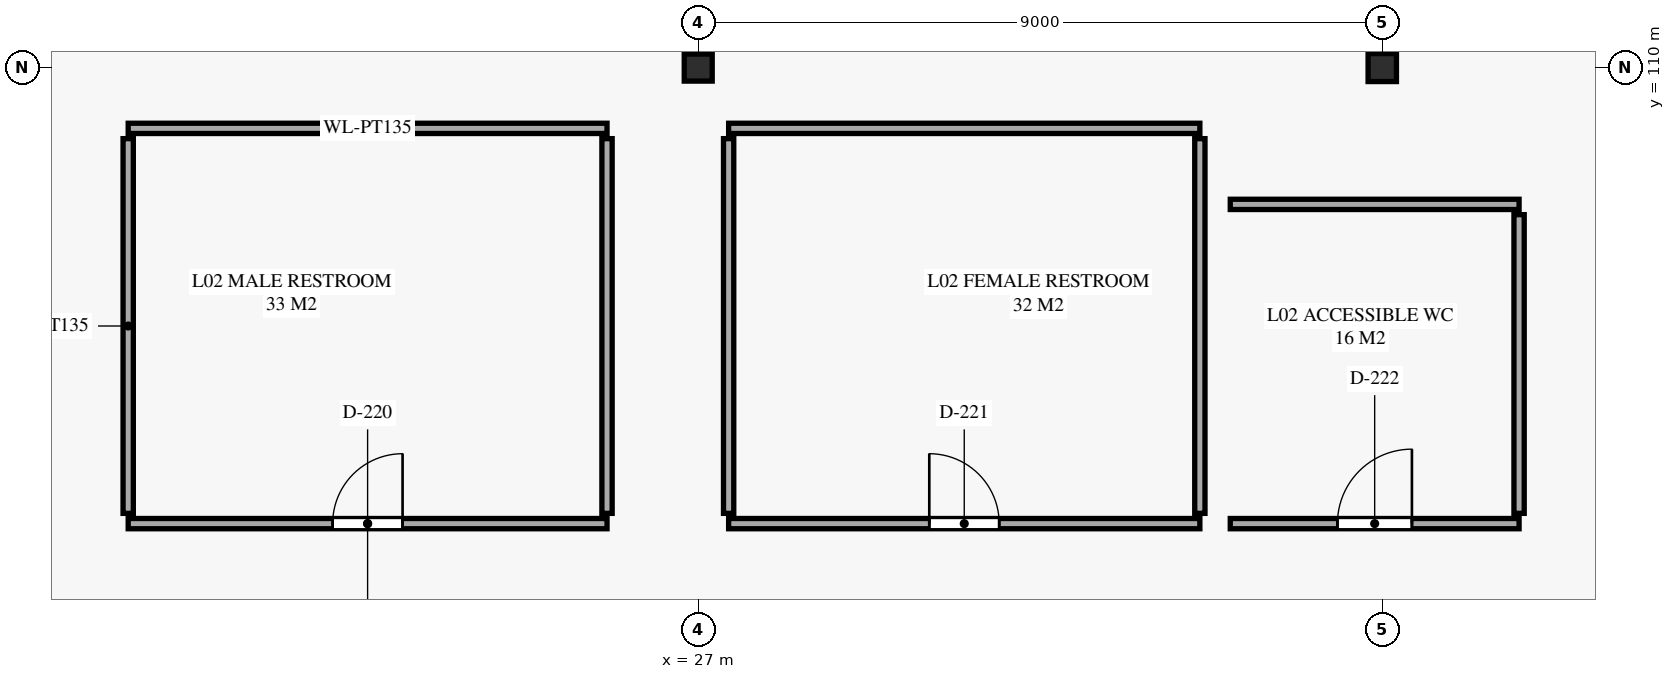
"""IFC4 building model, lengths in metres.
Left out: names, types, materials, properties, quantities, classifications, styles, units other than length and angle.
Written with IfcOpenShell. Run it as: python <this file> out.ifc"""

import sys

from ifc_helpers import new_model, si_unit, direction, frame, frame_2d, origin, origin_2d, place, context, subcontext, project, spatial, rectangle, i_section, extrude, element, fill, save


model = new_model("IFC4")
c1 = context("Model", 3, precision=1e-05, world=origin(), true_north=direction((0.0, 1.0)))
c2 = subcontext(c1, "Body", "Model", "MODEL_VIEW")
j1 = project(units=[si_unit("LENGTHUNIT", "METRE"), si_unit("PLANEANGLEUNIT", "RADIAN")], contexts=[c1])
p1 = place(None, origin())
s1 = spatial("IfcSite", under=j1, at=p1, CompositionType="ELEMENT")
p2 = place(p1, origin())
s2 = spatial("IfcBuilding", under=s1, at=p2, CompositionType="ELEMENT")
p3 = place(p2, frame((0.0, 0.0, 10.0)))
s3 = spatial("IfcBuildingStorey", under=s2, at=p3, CompositionType="ELEMENT", Elevation=10.0)
p4 = place(p3, frame((27.0, 110.0, 0.0), z_axis=(0.0, 0.0, 1.0), x_axis=(1.0, 0.0, 0.0)))
e1 = element("IfcColumn", 1, at=p4, inside=s3, PredefinedType="COLUMN", context=c2, shape_type="SweptSolid", body=[
    extrude(i_section(OverallWidth=0.368, OverallDepth=0.356, WebThickness=0.011, FlangeThickness=0.018, FilletRadius=0.015, at=origin_2d()), origin(), (0.0, 0.0, 1.0), 5.0),
])
p5 = place(p3, frame((36.0, 110.0, 0.0), z_axis=(0.0, 0.0, 1.0), x_axis=(1.0, 0.0, 0.0)))
e2 = element("IfcColumn", 2, at=p5, inside=s3, PredefinedType="COLUMN", context=c2, shape_type="SweptSolid", body=[
    extrude(i_section(OverallWidth=0.373, OverallDepth=0.368, WebThickness=0.015, FlangeThickness=0.024, FilletRadius=0.015, at=origin_2d()), origin(), (0.0, 0.0, 1.0), 5.0),
])
p6 = place(p3, frame((19.5, 104.0, 0.0), z_axis=(0.0, 0.0, 1.0), x_axis=(1.0, 0.0, 0.0)))
e3 = element("IfcWall", 3, at=p6, inside=s3, PredefinedType="PARTITIONING", context=c2, shape_type="SweptSolid", body=[
    extrude(rectangle(XDim=6.3, YDim=0.135, at=frame_2d((3.15, 0.0))), origin(), (0.0, 0.0, 1.0), 4.72),
])
p7 = place(p6, frame((2.69, 0.0, 0.0)))
e4 = element("IfcOpeningElement", 4, at=p7, cuts=e3, PredefinedType="OPENING", context=c2, shape_type="SweptSolid", body=[
    extrude(rectangle(XDim=0.92, YDim=2.1, at=frame_2d((0.46, 1.05))), frame((0.0, 0.078, 0.0), z_axis=(0.0, -1.0, 0.0), x_axis=(1.0, 0.0, 0.0)), (0.0, 0.0, 1.0), 0.155),
])
p8 = place(p3, frame((25.8, 109.2, 0.0), z_axis=(0.0, 0.0, 1.0), x_axis=(-1.0, 0.0, 0.0)))
e5 = element("IfcWall", 5, at=p8, inside=s3, PredefinedType="PARTITIONING", context=c2, shape_type="SweptSolid", body=[
    extrude(rectangle(XDim=6.3, YDim=0.135, at=frame_2d((3.15, 0.0))), origin(), (0.0, 0.0, 1.0), 4.72),
])
for number, where, z_axis, x_axis in (
    (6, (19.5, 109.065, 0.0), (0.0, 0.0, 1.0), (0.0, -1.0, 0.0)),
    (7, (25.8, 104.135, 0.0), (0.0, 0.0, 1.0), (0.0, 1.0, 0.0)),
):
    element("IfcWall", number, at=place(p3, frame(where, z_axis=z_axis, x_axis=x_axis)), inside=s3, PredefinedType="PARTITIONING", context=c2, shape_type="SweptSolid", body=[
        extrude(rectangle(XDim=4.93, YDim=0.135, at=frame_2d((2.465, 0.0))), origin(), (0.0, 0.0, 1.0), 4.72),
    ])
p9 = place(p3, frame((27.4, 104.0, 0.0), z_axis=(0.0, 0.0, 1.0), x_axis=(1.0, 0.0, 0.0)))
e8 = element("IfcWall", 8, at=p9, inside=s3, PredefinedType="PARTITIONING", context=c2, shape_type="SweptSolid", body=[
    extrude(rectangle(XDim=6.2, YDim=0.135, at=frame_2d((3.1, 0.0))), origin(), (0.0, 0.0, 1.0), 4.72),
])
p10 = place(p9, frame((2.64, 0.0, 0.0)))
e9 = element("IfcOpeningElement", 9, at=p10, cuts=e8, PredefinedType="OPENING", context=c2, shape_type="SweptSolid", body=[
    extrude(rectangle(XDim=0.92, YDim=2.1, at=frame_2d((0.46, 1.05))), frame((0.0, 0.078, 0.0), z_axis=(0.0, -1.0, 0.0), x_axis=(1.0, 0.0, 0.0)), (0.0, 0.0, 1.0), 0.155),
])
p11 = place(p3, frame((33.6, 109.2, 0.0), z_axis=(0.0, 0.0, 1.0), x_axis=(-1.0, 0.0, 0.0)))
e10 = element("IfcWall", 10, at=p11, inside=s3, PredefinedType="PARTITIONING", context=c2, shape_type="SweptSolid", body=[
    extrude(rectangle(XDim=6.2, YDim=0.135, at=frame_2d((3.1, 0.0))), origin(), (0.0, 0.0, 1.0), 4.72),
])
p12 = place(p3, frame((27.4, 109.065, 0.0), z_axis=(0.0, 0.0, 1.0), x_axis=(0.0, -1.0, 0.0)))
e11 = element("IfcWall", 11, at=p12, inside=s3, PredefinedType="PARTITIONING", context=c2, shape_type="SweptSolid", body=[
    extrude(rectangle(XDim=4.93, YDim=0.135, at=frame_2d((2.465, 0.0))), origin(), (0.0, 0.0, 1.0), 4.72),
])
p13 = place(p3, frame((33.6, 104.135, 0.0), z_axis=(0.0, 0.0, 1.0), x_axis=(0.0, 1.0, 0.0)))
e12 = element("IfcWall", 12, at=p13, inside=s3, PredefinedType="PARTITIONING", context=c2, shape_type="SweptSolid", body=[
    extrude(rectangle(XDim=4.93, YDim=0.135, at=frame_2d((2.465, 0.0))), origin(), (0.0, 0.0, 1.0), 4.306),
])
p14 = place(p3, frame((34.0, 104.0, 0.0), z_axis=(0.0, 0.0, 1.0), x_axis=(1.0, 0.0, 0.0)))
e13 = element("IfcWall", 13, at=p14, inside=s3, PredefinedType="PARTITIONING", context=c2, shape_type="SweptSolid", body=[
    extrude(rectangle(XDim=3.8, YDim=0.135, at=frame_2d((1.9, 0.0))), origin(), (0.0, 0.0, 1.0), 4.72),
])
p15 = place(p14, frame((1.41, 0.0, 0.0)))
e14 = element("IfcOpeningElement", 14, at=p15, cuts=e13, PredefinedType="OPENING", context=c2, shape_type="SweptSolid", body=[
    extrude(rectangle(XDim=0.98, YDim=2.1, at=frame_2d((0.49, 1.05))), frame((0.0, 0.078, 0.0), z_axis=(0.0, -1.0, 0.0), x_axis=(1.0, 0.0, 0.0)), (0.0, 0.0, 1.0), 0.155),
])
p16 = place(p3, frame((37.8, 108.2, 0.0), z_axis=(0.0, 0.0, 1.0), x_axis=(-1.0, 0.0, 0.0)))
e15 = element("IfcWall", 15, at=p16, inside=s3, PredefinedType="PARTITIONING", context=c2, shape_type="SweptSolid", body=[
    extrude(rectangle(XDim=3.8, YDim=0.135, at=frame_2d((1.9, 0.0))), origin(), (0.0, 0.0, 1.0), 4.72),
])
p17 = place(p3, frame((37.8, 104.135, 0.0), z_axis=(0.0, 0.0, 1.0), x_axis=(0.0, 1.0, 0.0)))
e16 = element("IfcWall", 16, at=p17, inside=s3, PredefinedType="PARTITIONING", context=c2, shape_type="SweptSolid", body=[
    extrude(rectangle(XDim=3.93, YDim=0.135, at=frame_2d((1.965, 0.0))), origin(), (0.0, 0.0, 1.0), 4.72),
])
p18 = place(p7, origin())
e17 = element("IfcDoor", 17, at=p18, inside=s3, OperationType="SINGLE_SWING_RIGHT", PredefinedType="DOOR", context=c2, shape_type="SweptSolid", body=[
    extrude(rectangle(XDim=0.92, YDim=2.1, at=frame_2d((0.46, 1.05))), frame((0.0, 0.025, 0.0), z_axis=(0.0, -1.0, 0.0), x_axis=(1.0, 0.0, 0.0)), (0.0, 0.0, 1.0), 0.05),
])
fill(e4, e17)
p19 = place(p10, origin())
e18 = element("IfcDoor", 18, at=p19, inside=s3, OperationType="SINGLE_SWING_LEFT", PredefinedType="DOOR", context=c2, shape_type="SweptSolid", body=[
    extrude(rectangle(XDim=0.92, YDim=2.1, at=frame_2d((0.46, 1.05))), frame((0.0, 0.025, 0.0), z_axis=(0.0, -1.0, 0.0), x_axis=(1.0, 0.0, 0.0)), (0.0, 0.0, 1.0), 0.05),
])
fill(e9, e18)
p20 = place(p15, origin())
e19 = element("IfcDoor", 19, at=p20, inside=s3, OperationType="SINGLE_SWING_RIGHT", PredefinedType="DOOR", context=c2, shape_type="SweptSolid", body=[
    extrude(rectangle(XDim=0.98, YDim=2.1, at=frame_2d((0.49, 1.05))), frame((0.0, 0.025, 0.0), z_axis=(0.0, -1.0, 0.0), x_axis=(1.0, 0.0, 0.0)), (0.0, 0.0, 1.0), 0.05),
])
fill(e14, e19)
save(model, sys.argv[1])
